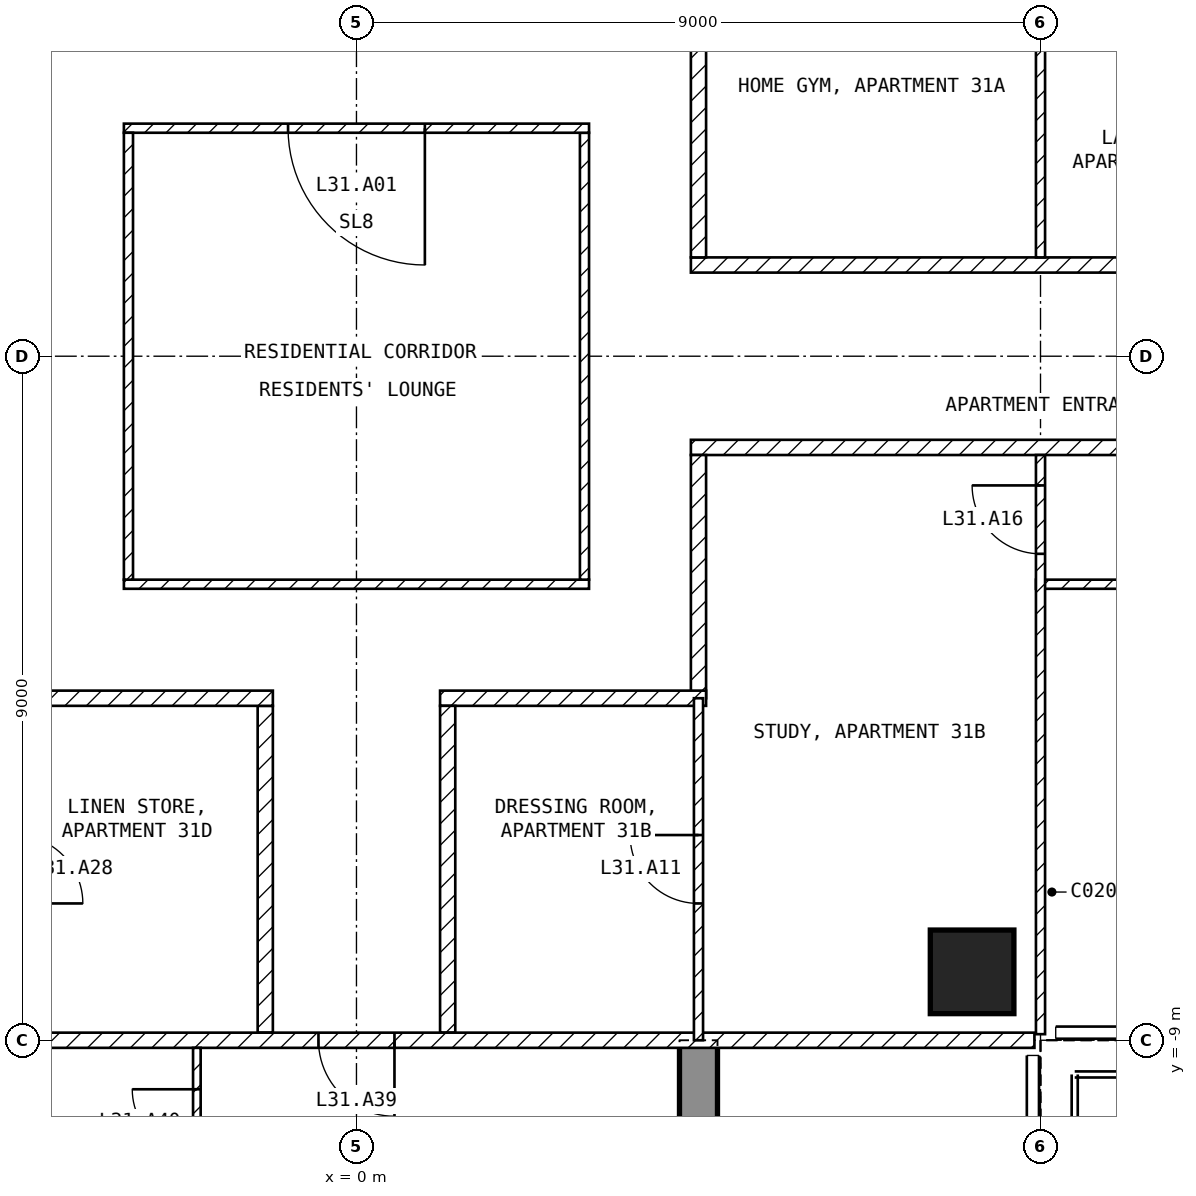
"""IFC4 building model, lengths in metres.
Left out: names, types, materials, properties, quantities, classifications, styles, units other than length and angle.
Written with IfcOpenShell. Run it as: python <this file> out.ifc"""

import sys

from ifc_helpers import new_model, si_unit, direction, frame, frame_2d, origin, origin_2d, place, context, subcontext, project, spatial, polyline, rectangle, outline, extrude, element, fill, save


model = new_model("IFC4")
c1 = context("Model", 3, precision=1e-05, world=origin(), true_north=direction((0.0, 1.0)))
c2 = subcontext(c1, "Body", "Model", "MODEL_VIEW")
j1 = project(units=[si_unit("LENGTHUNIT", "METRE"), si_unit("PLANEANGLEUNIT", "RADIAN")], contexts=[c1])
p1 = place(None, origin())
s1 = spatial("IfcSite", under=j1, at=p1, CompositionType="ELEMENT")
p2 = place(p1, origin())
s2 = spatial("IfcBuilding", under=s1, at=p2, CompositionType="ELEMENT")
p3 = place(p2, frame((0.0, 0.0, 130.4)))
s3 = spatial("IfcBuildingStorey", under=s2, at=p3, CompositionType="ELEMENT", Elevation=130.4)
p4 = place(p3, frame((8.1, -8.1, -0.25), z_axis=(0.0, 0.0, 1.0), x_axis=(1.0, 0.0, 0.0)))
e1 = element("IfcColumn", 1, at=p4, inside=s3, PredefinedType="COLUMN", context=c2, shape_type="SweptSolid", body=[
    extrude(rectangle(XDim=1.1, YDim=1.1, at=origin_2d()), origin(), (0.0, 0.0, 1.0), 3.5),
])
p5 = place(p3, frame((4.25, -20.15, -0.25), z_axis=(1.0, 0.0, 0.0), x_axis=(0.0, 1.0, 0.0)))
e2 = element("IfcWall", 2, at=p5, inside=s3, PredefinedType="SHEAR", context=c2, shape_type="SweptSolid", body=[
    extrude(outline(polyline([(0.0, 0.0), (6.65, 0.0), (6.65, 2.65), (9.05, 2.65), (9.05, 0.0), (11.15, 0.0), (11.15, 3.5), (0.0, 3.5), (0.0, 0.0)])), origin(), (0.0, 0.0, 1.0), 0.5),
])
p6 = place(p3, frame((-3.06, -3.0, 0.0), z_axis=(0.0, 0.0, 1.0), x_axis=(1.0, 0.0, 0.0)))
e3 = element("IfcWall", 3, at=p6, inside=s3, PredefinedType="PARTITIONING", context=c2, shape_type="SweptSolid", body=[
    extrude(rectangle(XDim=6.12, YDim=0.12, at=frame_2d((3.06, 0.0))), origin(), (0.0, 0.0, 1.0), 3.25),
])
p7 = place(p3, frame((3.0, -2.94, 0.0), z_axis=(0.0, 0.0, 1.0), x_axis=(0.0, 1.0, 0.0)))
e4 = element("IfcWall", 4, at=p7, inside=s3, PredefinedType="PARTITIONING", context=c2, shape_type="SweptSolid", body=[
    extrude(rectangle(XDim=5.88, YDim=0.12, at=frame_2d((2.94, 0.0))), origin(), (0.0, 0.0, 1.0), 3.25),
])
p8 = place(p3, frame((3.06, 3.0, 0.0), z_axis=(0.0, 0.0, 1.0), x_axis=(-1.0, 0.0, 0.0)))
e5 = element("IfcWall", 5, at=p8, inside=s3, PredefinedType="PARTITIONING", context=c2, shape_type="SweptSolid", body=[
    extrude(rectangle(XDim=6.12, YDim=0.12, at=frame_2d((3.06, 0.0))), origin(), (0.0, 0.0, 1.0), 3.25),
])
p9 = place(p8, frame((2.16, 0.0, 0.0)))
e6 = element("IfcOpeningElement", 6, at=p9, cuts=e5, PredefinedType="OPENING", context=c2, shape_type="SweptSolid", body=[
    extrude(rectangle(XDim=1.8, YDim=2.1, at=frame_2d((0.9, 1.05))), frame((0.0, 0.07, 0.0), z_axis=(0.0, -1.0, 0.0), x_axis=(1.0, 0.0, 0.0)), (0.0, 0.0, 1.0), 0.14),
])
p10 = place(p3, frame((-3.0, 2.94, 0.0), z_axis=(0.0, 0.0, 1.0), x_axis=(0.0, -1.0, 0.0)))
e7 = element("IfcWall", 7, at=p10, inside=s3, PredefinedType="PARTITIONING", context=c2, shape_type="SweptSolid", body=[
    extrude(rectangle(XDim=5.88, YDim=0.12, at=frame_2d((2.94, 0.0))), origin(), (0.0, 0.0, 1.0), 3.25),
])
p11 = place(p3, frame((4.4, 1.2, 0.0), z_axis=(0.0, 0.0, 1.0), x_axis=(1.0, 0.0, 0.0)))
e8 = element("IfcWall", 8, at=p11, inside=s3, PredefinedType="PARTITIONING", context=c2, shape_type="SweptSolid", body=[
    extrude(rectangle(XDim=17.2, YDim=0.2, at=frame_2d((8.6, 0.0))), origin(), (0.0, 0.0, 1.0), 3.25),
])
p12 = place(p11, frame((8.45, 0.0, 0.0)))
e9 = element("IfcOpeningElement", 9, at=p12, cuts=e8, PredefinedType="OPENING", context=c2, shape_type="SweptSolid", body=[
    extrude(rectangle(XDim=1.0, YDim=2.1, at=frame_2d((0.5, 1.05))), frame((0.0, 0.11, 0.0), z_axis=(0.0, -1.0, 0.0), x_axis=(1.0, 0.0, 0.0)), (0.0, 0.0, 1.0), 0.22),
])
p13 = place(p3, frame((4.5, 4.5, 0.0), z_axis=(0.0, 0.0, 1.0), x_axis=(0.0, -1.0, 0.0)))
e10 = element("IfcWall", 10, at=p13, inside=s3, PredefinedType="PARTITIONING", context=c2, shape_type="SweptSolid", body=[
    extrude(rectangle(XDim=3.2, YDim=0.2, at=frame_2d((1.6, 0.0))), origin(), (0.0, 0.0, 1.0), 3.25),
])
p14 = place(p3, frame((21.6, -1.2, 0.0), z_axis=(0.0, 0.0, 1.0), x_axis=(-1.0, 0.0, 0.0)))
e11 = element("IfcWall", 11, at=p14, inside=s3, PredefinedType="PARTITIONING", context=c2, shape_type="SweptSolid", body=[
    extrude(rectangle(XDim=17.2, YDim=0.2, at=frame_2d((8.6, 0.0))), origin(), (0.0, 0.0, 1.0), 3.25),
])
p15 = place(p14, frame((10.45, 0.0, 0.0)))
e12 = element("IfcOpeningElement", 12, at=p15, cuts=e11, PredefinedType="OPENING", context=c2, shape_type="SweptSolid", body=[
    extrude(rectangle(XDim=1.0, YDim=2.1, at=frame_2d((0.5, 1.05))), frame((0.0, 0.11, 0.0), z_axis=(0.0, -1.0, 0.0), x_axis=(1.0, 0.0, 0.0)), (0.0, 0.0, 1.0), 0.22),
])
p16 = place(p3, frame((4.5, -1.3, 0.0), z_axis=(0.0, 0.0, 1.0), x_axis=(0.0, -1.0, 0.0)))
e13 = element("IfcWall", 13, at=p16, inside=s3, PredefinedType="PARTITIONING", context=c2, shape_type="SweptSolid", body=[
    extrude(rectangle(XDim=3.2, YDim=0.2, at=frame_2d((1.6, 0.0))), origin(), (0.0, 0.0, 1.0), 3.25),
])
p17 = place(p3, frame((4.6, -4.5, 0.0), z_axis=(0.0, 0.0, 1.0), x_axis=(-1.0, 0.0, 0.0)))
e14 = element("IfcWall", 14, at=p17, inside=s3, PredefinedType="PARTITIONING", context=c2, shape_type="SweptSolid", body=[
    extrude(rectangle(XDim=3.5, YDim=0.2, at=frame_2d((1.75, 0.0))), origin(), (0.0, 0.0, 1.0), 3.25),
])
for number, where, z_axis, x_axis in (
    (15, (1.2, -4.6, 0.0), (0.0, 0.0, 1.0), (0.0, -1.0, 0.0)),
    (16, (-1.2, -8.9, 0.0), (0.0, 0.0, 1.0), (0.0, 1.0, 0.0)),
):
    element("IfcWall", number, at=place(p3, frame(where, z_axis=z_axis, x_axis=x_axis)), inside=s3, PredefinedType="PARTITIONING", context=c2, shape_type="SweptSolid", body=[
        extrude(rectangle(XDim=4.3, YDim=0.2, at=frame_2d((2.15, 0.0))), origin(), (0.0, 0.0, 1.0), 3.25),
    ])
p18 = place(p3, frame((-1.1, -4.5, 0.0), z_axis=(0.0, 0.0, 1.0), x_axis=(-1.0, 0.0, 0.0)))
e17 = element("IfcWall", 17, at=p18, inside=s3, PredefinedType="PARTITIONING", context=c2, shape_type="SweptSolid", body=[
    extrude(rectangle(XDim=3.5, YDim=0.2, at=frame_2d((1.75, 0.0))), origin(), (0.0, 0.0, 1.0), 3.25),
])
p19 = place(p3, frame((8.92, -9.0, 0.0), z_axis=(0.0, 0.0, 1.0), x_axis=(-1.0, 0.0, 0.0)))
e18 = element("IfcWall", 18, at=p19, inside=s3, PredefinedType="PARTITIONING", context=c2, shape_type="SweptSolid", body=[
    extrude(rectangle(XDim=17.84, YDim=0.2, at=frame_2d((8.92, 0.0))), origin(), (0.0, 0.0, 1.0), 3.25),
])
p20 = place(p19, frame((8.42, 0.0, 0.0)))
e19 = element("IfcOpeningElement", 19, at=p20, cuts=e18, PredefinedType="OPENING", context=c2, shape_type="SweptSolid", body=[
    extrude(rectangle(XDim=1.0, YDim=2.1, at=frame_2d((0.5, 1.05))), frame((0.0, 0.11, 0.0), z_axis=(0.0, -1.0, 0.0), x_axis=(1.0, 0.0, 0.0)), (0.0, 0.0, 1.0), 0.22),
])
p21 = place(p3, frame((9.0, 1.3, 0.0), z_axis=(0.0, 0.0, 1.0), x_axis=(0.0, 1.0, 0.0)))
e20 = element("IfcWall", 20, at=p21, inside=s3, PredefinedType="PARTITIONING", context=c2, shape_type="SweptSolid", body=[
    extrude(rectangle(XDim=7.62, YDim=0.12, at=frame_2d((3.81, 0.0))), origin(), (0.0, 0.0, 1.0), 3.25),
])
p22 = place(p21, frame((3.29, 0.0, 0.0)))
e21 = element("IfcOpeningElement", 21, at=p22, cuts=e20, PredefinedType="OPENING", context=c2, shape_type="SweptSolid", body=[
    extrude(rectangle(XDim=0.9, YDim=2.1, at=frame_2d((0.45, 1.05))), frame((0.0, 0.07, 0.0), z_axis=(0.0, -1.0, 0.0), x_axis=(1.0, 0.0, 0.0)), (0.0, 0.0, 1.0), 0.14),
])
p23 = place(p21, frame((4.65, 0.0, 0.0)))
e22 = element("IfcOpeningElement", 22, at=p23, cuts=e20, PredefinedType="OPENING", context=c2, shape_type="SweptSolid", body=[
    extrude(rectangle(XDim=0.9, YDim=2.1, at=frame_2d((0.45, 1.05))), frame((0.0, 0.07, 0.0), z_axis=(0.0, -1.0, 0.0), x_axis=(1.0, 0.0, 0.0)), (0.0, 0.0, 1.0), 0.14),
])
p24 = place(p3, frame((15.6, -3.0, 0.0), z_axis=(0.0, 0.0, 1.0), x_axis=(-1.0, 0.0, 0.0)))
e23 = element("IfcWall", 23, at=p24, inside=s3, PredefinedType="PARTITIONING", context=c2, shape_type="SweptSolid", body=[
    extrude(rectangle(XDim=6.66, YDim=0.12, at=frame_2d((3.33, 0.0))), origin(), (0.0, 0.0, 1.0), 3.25),
])
p25 = place(p24, frame((4.5, 0.0, 0.0)))
e24 = element("IfcOpeningElement", 24, at=p25, cuts=e23, PredefinedType="OPENING", context=c2, shape_type="SweptSolid", body=[
    extrude(rectangle(XDim=0.9, YDim=2.1, at=frame_2d((0.45, 1.05))), frame((0.0, 0.07, 0.0), z_axis=(0.0, -1.0, 0.0), x_axis=(1.0, 0.0, 0.0)), (0.0, 0.0, 1.0), 0.14),
])
p26 = place(p3, frame((9.0, -8.92, 0.0), z_axis=(0.0, 0.0, 1.0), x_axis=(0.0, 1.0, 0.0)))
e25 = element("IfcWall", 25, at=p26, inside=s3, PredefinedType="PARTITIONING", context=c2, shape_type="SweptSolid", body=[
    extrude(rectangle(XDim=7.62, YDim=0.12, at=frame_2d((3.81, 0.0))), origin(), (0.0, 0.0, 1.0), 3.25),
])
p27 = place(p26, frame((6.32, 0.0, 0.0)))
e26 = element("IfcOpeningElement", 26, at=p27, cuts=e25, PredefinedType="OPENING", context=c2, shape_type="SweptSolid", body=[
    extrude(rectangle(XDim=0.9, YDim=2.1, at=frame_2d((0.45, 1.05))), frame((0.0, 0.07, 0.0), z_axis=(0.0, -1.0, 0.0), x_axis=(1.0, 0.0, 0.0)), (0.0, 0.0, 1.0), 0.14),
])
p28 = place(p3, frame((4.5, -9.0, 0.0), z_axis=(0.0, 0.0, 1.0), x_axis=(0.0, 1.0, 0.0)))
e27 = element("IfcWall", 27, at=p28, inside=s3, PredefinedType="PARTITIONING", context=c2, shape_type="SweptSolid", body=[
    extrude(rectangle(XDim=4.5, YDim=0.12, at=frame_2d((2.25, 0.0))), origin(), (0.0, 0.0, 1.0), 3.25),
])
p29 = place(p28, frame((1.8, 0.0, 0.0)))
e28 = element("IfcOpeningElement", 28, at=p29, cuts=e27, PredefinedType="OPENING", context=c2, shape_type="SweptSolid", body=[
    extrude(rectangle(XDim=0.9, YDim=2.1, at=frame_2d((0.45, 1.05))), frame((0.0, 0.07, 0.0), z_axis=(0.0, -1.0, 0.0), x_axis=(1.0, 0.0, 0.0)), (0.0, 0.0, 1.0), 0.14),
])
p30 = place(p3, frame((-2.1, -11.04, 0.0), z_axis=(0.0, 0.0, 1.0), x_axis=(0.0, 1.0, 0.0)))
e29 = element("IfcWall", 29, at=p30, inside=s3, PredefinedType="PARTITIONING", context=c2, shape_type="SweptSolid", body=[
    extrude(rectangle(XDim=1.94, YDim=0.1, at=frame_2d((0.97, 0.0))), origin(), (0.0, 0.0, 1.0), 3.25),
])
p31 = place(p30, frame((0.545, 0.0, 0.0)))
e30 = element("IfcOpeningElement", 30, at=p31, cuts=e29, PredefinedType="OPENING", context=c2, shape_type="SweptSolid", body=[
    extrude(rectangle(XDim=0.85, YDim=2.1, at=frame_2d((0.425, 1.05))), frame((0.0, 0.06, 0.0), z_axis=(0.0, -1.0, 0.0), x_axis=(1.0, 0.0, 0.0)), (0.0, 0.0, 1.0), 0.12),
])
p32 = place(p9, origin())
e31 = element("IfcDoor", 31, at=p32, inside=s3, OperationType="SINGLE_SWING_LEFT", PredefinedType="DOOR", context=c2, shape_type="SweptSolid", body=[
    extrude(rectangle(XDim=1.8, YDim=2.1, at=frame_2d((0.9, 1.05))), frame((0.0, 0.025, 0.0), z_axis=(0.0, -1.0, 0.0), x_axis=(1.0, 0.0, 0.0)), (0.0, 0.0, 1.0), 0.05),
])
fill(e6, e31)
p33 = place(p29, origin())
e32 = element("IfcDoor", 32, at=p33, inside=s3, OperationType="SINGLE_SWING_RIGHT", PredefinedType="DOOR", context=c2, shape_type="SweptSolid", body=[
    extrude(rectangle(XDim=0.9, YDim=2.1, at=frame_2d((0.45, 1.05))), frame((0.0, 0.025, 0.0), z_axis=(0.0, -1.0, 0.0), x_axis=(1.0, 0.0, 0.0)), (0.0, 0.0, 1.0), 0.05),
])
fill(e28, e32)
p34 = place(p27, origin())
e33 = element("IfcDoor", 33, at=p34, inside=s3, OperationType="SINGLE_SWING_RIGHT", PredefinedType="DOOR", context=c2, shape_type="SweptSolid", body=[
    extrude(rectangle(XDim=0.9, YDim=2.1, at=frame_2d((0.45, 1.05))), frame((0.0, 0.025, 0.0), z_axis=(0.0, -1.0, 0.0), x_axis=(1.0, 0.0, 0.0)), (0.0, 0.0, 1.0), 0.05),
])
fill(e26, e33)
p35 = place(p20, origin())
e34 = element("IfcDoor", 34, at=p35, inside=s3, OperationType="SINGLE_SWING_LEFT", PredefinedType="DOOR", context=c2, shape_type="SweptSolid", body=[
    extrude(rectangle(XDim=1.0, YDim=2.1, at=frame_2d((0.5, 1.05))), frame((0.0, 0.025, 0.0), z_axis=(0.0, -1.0, 0.0), x_axis=(1.0, 0.0, 0.0)), (0.0, 0.0, 1.0), 0.05),
])
fill(e19, e34)
p36 = place(p31, origin())
e35 = element("IfcDoor", 35, at=p36, inside=s3, OperationType="SINGLE_SWING_RIGHT", PredefinedType="DOOR", context=c2, shape_type="SweptSolid", body=[
    extrude(rectangle(XDim=0.85, YDim=2.1, at=frame_2d((0.425, 1.05))), frame((0.0, 0.025, 0.0), z_axis=(0.0, -1.0, 0.0), x_axis=(1.0, 0.0, 0.0)), (0.0, 0.0, 1.0), 0.05),
])
fill(e30, e35)
save(model, sys.argv[1])
